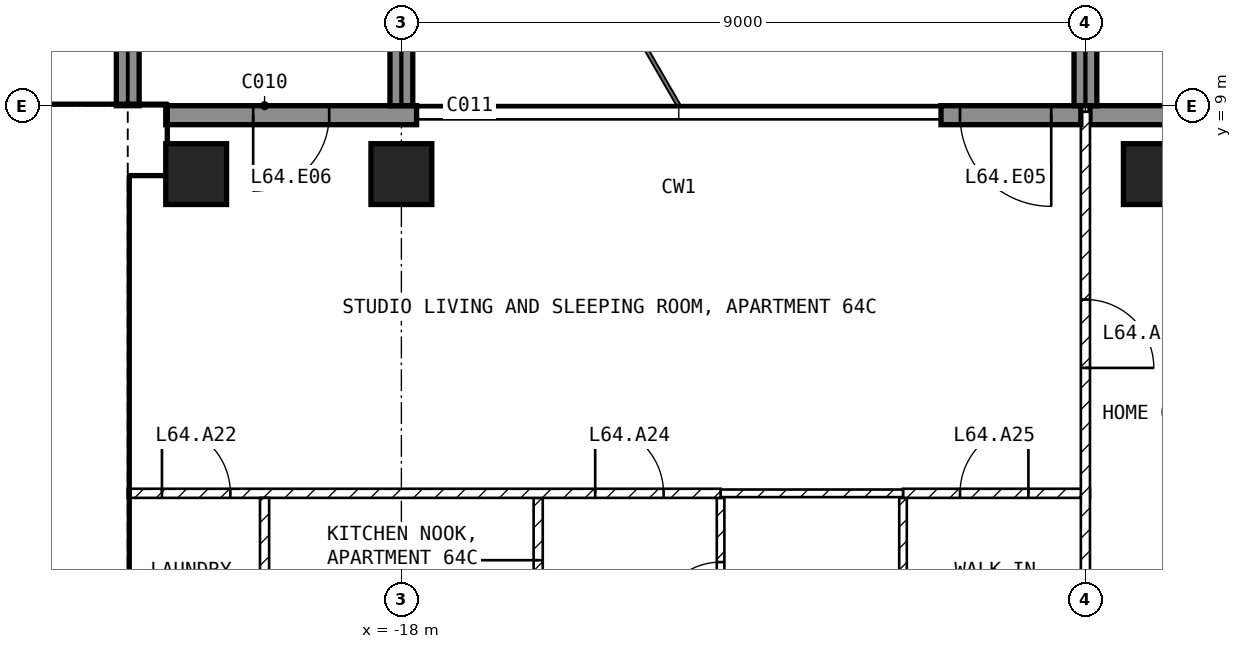
"""IFC4 building model, lengths in metres.
Left out: names, types, materials, properties, quantities, classifications, styles, units other than length and angle.
Written with IfcOpenShell. Run it as: python <this file> out.ifc"""

import sys

from ifc_helpers import new_model, si_unit, direction, frame, frame_2d, origin, origin_2d, place, context, subcontext, project, spatial, rectangle, extrude, element, fill, save


model = new_model("IFC4")
c1 = context("Model", 3, precision=1e-05, world=origin(), true_north=direction((0.0, 1.0)))
c2 = subcontext(c1, "Body", "Model", "MODEL_VIEW")
j1 = project(units=[si_unit("LENGTHUNIT", "METRE"), si_unit("PLANEANGLEUNIT", "RADIAN")], contexts=[c1])
p1 = place(None, origin())
s1 = spatial("IfcSite", under=j1, at=p1, CompositionType="ELEMENT")
p2 = place(p1, origin())
s2 = spatial("IfcBuilding", under=s1, at=p2, CompositionType="ELEMENT")
p3 = place(p2, frame((0.0, 0.0, 253.5)))
s3 = spatial("IfcBuildingStorey", under=s2, at=p3, CompositionType="ELEMENT", Elevation=253.5)
for number, where, z_axis, x_axis in (
    (1, (-20.7, 8.1, -0.25), (0.0, 0.0, 1.0), (1.0, 0.0, 0.0)),
    (2, (-18.0, 8.1, -0.25), (0.0, 0.0, 1.0), (1.0, 0.0, 0.0)),
    (3, (-8.1, 8.1, -0.25), (0.0, 0.0, 1.0), (1.0, 0.0, 0.0)),
):
    element("IfcColumn", number, at=place(p3, frame(where, z_axis=z_axis, x_axis=x_axis)), inside=s3, PredefinedType="COLUMN", context=c2, shape_type="SweptSolid", body=[
        extrude(rectangle(XDim=0.8, YDim=0.8, at=origin_2d()), origin(), (0.0, 0.0, 1.0), 3.5),
    ])
p4 = place(p3, frame((-5.9, 8.875, 0.0), z_axis=(0.0, 0.0, 1.0), x_axis=(-1.0, 0.0, 0.0)))
e4 = element("IfcWall", 4, at=p4, inside=s3, PredefinedType="SOLIDWALL", context=c2, shape_type="SweptSolid", body=[
    extrude(rectangle(XDim=3.04, YDim=0.25, at=frame_2d((1.52, 0.0))), origin(), (0.0, 0.0, 1.0), 3.25),
])
p5 = place(p4, frame((0.25, 0.0, 0.0)))
e5 = element("IfcOpeningElement", 5, at=p5, cuts=e4, PredefinedType="OPENING", context=c2, shape_type="SweptSolid", body=[
    extrude(rectangle(XDim=1.2, YDim=2.4, at=frame_2d((0.6, 1.2))), frame((0.0, 0.135, 0.0), z_axis=(0.0, -1.0, 0.0), x_axis=(1.0, 0.0, 0.0)), (0.0, 0.0, 1.0), 0.27),
])
p6 = place(p3, frame((-9.06, 8.875, 0.0), z_axis=(0.0, 0.0, 1.0), x_axis=(-1.0, 0.0, 0.0)))
e6 = element("IfcWall", 6, at=p6, inside=s3, PredefinedType="SOLIDWALL", context=c2, shape_type="SweptSolid", body=[
    extrude(rectangle(XDim=1.84, YDim=0.25, at=frame_2d((0.92, 0.0))), origin(), (0.0, 0.0, 1.0), 3.25),
])
p7 = place(p6, frame((0.39, 0.0, 0.0)))
e7 = element("IfcOpeningElement", 7, at=p7, cuts=e6, PredefinedType="OPENING", context=c2, shape_type="SweptSolid", body=[
    extrude(rectangle(XDim=1.2, YDim=2.4, at=frame_2d((0.6, 1.2))), frame((0.0, 0.135, 0.0), z_axis=(0.0, -1.0, 0.0), x_axis=(1.0, 0.0, 0.0)), (0.0, 0.0, 1.0), 0.27),
])
p8 = place(p3, frame((-17.8, 8.875, 0.0), z_axis=(0.0, 0.0, 1.0), x_axis=(-1.0, 0.0, 0.0)))
e8 = element("IfcWall", 8, at=p8, inside=s3, PredefinedType="SOLIDWALL", context=c2, shape_type="SweptSolid", body=[
    extrude(rectangle(XDim=3.3, YDim=0.25, at=frame_2d((1.65, 0.0))), origin(), (0.0, 0.0, 1.0), 3.25),
])
p9 = place(p8, frame((1.15, 0.0, 0.0)))
e9 = element("IfcOpeningElement", 9, at=p9, cuts=e8, PredefinedType="OPENING", context=c2, shape_type="SweptSolid", body=[
    extrude(rectangle(XDim=1.0, YDim=2.4, at=frame_2d((0.5, 1.2))), frame((0.0, 0.135, 0.0), z_axis=(0.0, -1.0, 0.0), x_axis=(1.0, 0.0, 0.0)), (0.0, 0.0, 1.0), 0.27),
])
for number, where, z_axis, x_axis in (
    (10, (-21.6, 9.0, 0.0), (0.0, 0.0, 1.0), (0.0, 1.0, 0.0)),
    (11, (-18.0, 9.0, 0.0), (0.0, 0.0, 1.0), (0.0, 1.0, 0.0)),
    (12, (-9.0, 9.0, 0.0), (0.0, 0.0, 1.0), (0.0, 1.0, 0.0)),
):
    element("IfcWall", number, at=place(p3, frame(where, z_axis=z_axis, x_axis=x_axis)), inside=s3, PredefinedType="SOLIDWALL", context=c2, shape_type="SweptSolid", body=[
        extrude(rectangle(XDim=2.7, YDim=0.3, at=frame_2d((1.35, 0.0))), origin(), (0.0, 0.0, 1.0), 3.25),
    ])
p10 = place(p3, frame((-29.75, 8.55, 0.0), z_axis=(0.0, 0.0, 1.0), x_axis=(1.0, 0.0, 0.0)))
e13 = element("IfcWall", 13, at=p10, inside=s3, PredefinedType="SHEAR", context=c2, shape_type="SweptSolid", body=[
    extrude(rectangle(XDim=8.65, YDim=0.9, at=frame_2d((4.325, 0.0))), origin(), (0.0, 0.0, 1.0), 3.25),
])
p11 = place(p3, frame((-21.825, 1.2, 0.0), z_axis=(0.0, 0.0, 1.0), x_axis=(0.0, 1.0, 0.0)))
e14 = element("IfcWall", 14, at=p11, inside=s3, PredefinedType="SHEAR", context=c2, shape_type="SweptSolid", body=[
    extrude(rectangle(XDim=6.9, YDim=0.45, at=frame_2d((3.45, 0.0))), origin(), (0.0, 0.0, 1.0), 3.25),
])
p12 = place(p3, frame((-28.35, 5.15, 0.0), z_axis=(0.0, 0.0, 1.0), x_axis=(1.0, 0.0, 0.0)))
e15 = element("IfcWall", 15, at=p12, inside=s3, PredefinedType="SOLIDWALL", context=c2, shape_type="SweptSolid", body=[
    extrude(rectangle(XDim=6.3, YDim=0.2, at=frame_2d((3.15, 0.0))), origin(), (0.0, 0.0, 1.0), 3.25),
])
p13 = place(p12, frame((5.1, 0.0, 0.0)))
e16 = element("IfcOpeningElement", 16, at=p13, cuts=e15, PredefinedType="OPENING", context=c2, shape_type="SweptSolid", body=[
    extrude(rectangle(XDim=1.0, YDim=2.1, at=frame_2d((0.5, 1.05))), frame((0.0, 0.11, 0.0), z_axis=(0.0, -1.0, 0.0), x_axis=(1.0, 0.0, 0.0)), (0.0, 0.0, 1.0), 0.22),
])
p14 = place(p3, frame((-11.4, 1.3, 0.0), z_axis=(0.0, 0.0, 1.0), x_axis=(0.0, 1.0, 0.0)))
e17 = element("IfcWall", 17, at=p14, inside=s3, PredefinedType="PARTITIONING", context=c2, shape_type="SweptSolid", body=[
    extrude(rectangle(XDim=2.54, YDim=0.1, at=frame_2d((1.27, 0.0))), origin(), (0.0, 0.0, 1.0), 3.25),
])
p15 = place(p3, frame((-11.4, 3.9, 0.0), z_axis=(0.0, 0.0, 1.0), x_axis=(1.0, 0.0, 0.0)))
e18 = element("IfcWall", 18, at=p15, inside=s3, PredefinedType="PARTITIONING", context=c2, shape_type="SweptSolid", body=[
    extrude(rectangle(XDim=2.46, YDim=0.12, at=frame_2d((1.23, 0.0))), origin(), (0.0, 0.0, 1.0), 3.25),
])
p16 = place(p15, frame((0.75, 0.0, 0.0)))
e19 = element("IfcOpeningElement", 19, at=p16, cuts=e18, PredefinedType="OPENING", context=c2, shape_type="SweptSolid", body=[
    extrude(rectangle(XDim=0.9, YDim=2.1, at=frame_2d((0.45, 1.05))), frame((0.0, 0.07, 0.0), z_axis=(0.0, -1.0, 0.0), x_axis=(1.0, 0.0, 0.0)), (0.0, 0.0, 1.0), 0.14),
])
p17 = place(p3, frame((-9.0, 8.92, 0.0), z_axis=(0.0, 0.0, 1.0), x_axis=(0.0, -1.0, 0.0)))
e20 = element("IfcWall", 20, at=p17, inside=s3, PredefinedType="PARTITIONING", context=c2, shape_type="SweptSolid", body=[
    extrude(rectangle(XDim=7.62, YDim=0.12, at=frame_2d((3.81, 0.0))), origin(), (0.0, 0.0, 1.0), 3.25),
])
p18 = place(p17, frame((2.47, 0.0, 0.0)))
e21 = element("IfcOpeningElement", 21, at=p18, cuts=e20, PredefinedType="OPENING", context=c2, shape_type="SweptSolid", body=[
    extrude(rectangle(XDim=0.9, YDim=2.1, at=frame_2d((0.45, 1.05))), frame((0.0, 0.07, 0.0), z_axis=(0.0, -1.0, 0.0), x_axis=(1.0, 0.0, 0.0)), (0.0, 0.0, 1.0), 0.14),
])
p19 = place(p3, frame((-13.8, 1.3, 0.0), z_axis=(0.0, 0.0, 1.0), x_axis=(0.0, 1.0, 0.0)))
e22 = element("IfcWall", 22, at=p19, inside=s3, PredefinedType="PARTITIONING", context=c2, shape_type="SweptSolid", body=[
    extrude(rectangle(XDim=2.54, YDim=0.1, at=frame_2d((1.27, 0.0))), origin(), (0.0, 0.0, 1.0), 3.25),
])
p20 = place(p19, frame((0.845, 0.0, 0.0)))
e23 = element("IfcOpeningElement", 23, at=p20, cuts=e22, PredefinedType="OPENING", context=c2, shape_type="SweptSolid", body=[
    extrude(rectangle(XDim=0.85, YDim=2.1, at=frame_2d((0.425, 1.05))), frame((0.0, 0.06, 0.0), z_axis=(0.0, -1.0, 0.0), x_axis=(1.0, 0.0, 0.0)), (0.0, 0.0, 1.0), 0.12),
])
p21 = place(p3, frame((-13.8, 3.9, 0.0), z_axis=(0.0, 0.0, 1.0), x_axis=(1.0, 0.0, 0.0)))
e24 = element("IfcWall", 24, at=p21, inside=s3, PredefinedType="PARTITIONING", context=c2, shape_type="SweptSolid", body=[
    extrude(rectangle(XDim=2.4, YDim=0.1, at=frame_2d((1.2, 0.0))), origin(), (0.0, 0.0, 1.0), 3.25),
])
p22 = place(p3, frame((-16.2, 1.3, 0.0), z_axis=(0.0, 0.0, 1.0), x_axis=(0.0, 1.0, 0.0)))
e25 = element("IfcWall", 25, at=p22, inside=s3, PredefinedType="PARTITIONING", context=c2, shape_type="SweptSolid", body=[
    extrude(rectangle(XDim=2.54, YDim=0.12, at=frame_2d((1.27, 0.0))), origin(), (0.0, 0.0, 1.0), 3.25),
])
p23 = place(p22, frame((0.82, 0.0, 0.0)))
e26 = element("IfcOpeningElement", 26, at=p23, cuts=e25, PredefinedType="OPENING", context=c2, shape_type="SweptSolid", body=[
    extrude(rectangle(XDim=0.9, YDim=2.1, at=frame_2d((0.45, 1.05))), frame((0.0, 0.07, 0.0), z_axis=(0.0, -1.0, 0.0), x_axis=(1.0, 0.0, 0.0)), (0.0, 0.0, 1.0), 0.14),
])
p24 = place(p3, frame((-21.6, 3.9, 0.0), z_axis=(0.0, 0.0, 1.0), x_axis=(1.0, 0.0, 0.0)))
e27 = element("IfcWall", 27, at=p24, inside=s3, PredefinedType="PARTITIONING", context=c2, shape_type="SweptSolid", body=[
    extrude(rectangle(XDim=7.8, YDim=0.12, at=frame_2d((3.9, 0.0))), origin(), (0.0, 0.0, 1.0), 3.25),
])
p25 = place(p24, frame((0.45, 0.0, 0.0)))
e28 = element("IfcOpeningElement", 28, at=p25, cuts=e27, PredefinedType="OPENING", context=c2, shape_type="SweptSolid", body=[
    extrude(rectangle(XDim=0.9, YDim=2.1, at=frame_2d((0.45, 1.05))), frame((0.0, 0.07, 0.0), z_axis=(0.0, -1.0, 0.0), x_axis=(1.0, 0.0, 0.0)), (0.0, 0.0, 1.0), 0.14),
])
p26 = place(p24, frame((6.15, 0.0, 0.0)))
e29 = element("IfcOpeningElement", 29, at=p26, cuts=e27, PredefinedType="OPENING", context=c2, shape_type="SweptSolid", body=[
    extrude(rectangle(XDim=0.9, YDim=2.1, at=frame_2d((0.45, 1.05))), frame((0.0, 0.07, 0.0), z_axis=(0.0, -1.0, 0.0), x_axis=(1.0, 0.0, 0.0)), (0.0, 0.0, 1.0), 0.14),
])
p27 = place(p3, frame((-19.8, 1.3, 0.0), z_axis=(0.0, 0.0, 1.0), x_axis=(0.0, 1.0, 0.0)))
e30 = element("IfcWall", 30, at=p27, inside=s3, PredefinedType="PARTITIONING", context=c2, shape_type="SweptSolid", body=[
    extrude(rectangle(XDim=2.54, YDim=0.12, at=frame_2d((1.27, 0.0))), origin(), (0.0, 0.0, 1.0), 3.25),
])
p28 = place(p7, origin())
e31 = element("IfcDoor", 31, at=p28, inside=s3, OperationType="SINGLE_SWING_LEFT", PredefinedType="DOOR", context=c2, shape_type="SweptSolid", body=[
    extrude(rectangle(XDim=1.2, YDim=2.4, at=frame_2d((0.6, 1.2))), frame((0.0, 0.025, 0.0), z_axis=(0.0, -1.0, 0.0), x_axis=(1.0, 0.0, 0.0)), (0.0, 0.0, 1.0), 0.05),
])
fill(e7, e31)
p29 = place(p9, origin())
e32 = element("IfcDoor", 32, at=p29, inside=s3, OperationType="SINGLE_SWING_RIGHT", PredefinedType="DOOR", context=c2, shape_type="SweptSolid", body=[
    extrude(rectangle(XDim=1.0, YDim=2.4, at=frame_2d((0.5, 1.2))), frame((0.0, 0.025, 0.0), z_axis=(0.0, -1.0, 0.0), x_axis=(1.0, 0.0, 0.0)), (0.0, 0.0, 1.0), 0.05),
])
fill(e9, e32)
p30 = place(p13, origin())
e33 = element("IfcDoor", 33, at=p30, inside=s3, OperationType="SINGLE_SWING_LEFT", PredefinedType="DOOR", context=c2, shape_type="SweptSolid", body=[
    extrude(rectangle(XDim=1.0, YDim=2.1, at=frame_2d((0.5, 1.05))), frame((0.0, 0.025, 0.0), z_axis=(0.0, -1.0, 0.0), x_axis=(1.0, 0.0, 0.0)), (0.0, 0.0, 1.0), 0.05),
])
fill(e16, e33)
p31 = place(p20, origin())
e34 = element("IfcDoor", 34, at=p31, inside=s3, OperationType="SINGLE_SWING_LEFT", PredefinedType="DOOR", context=c2, shape_type="SweptSolid", body=[
    extrude(rectangle(XDim=0.85, YDim=2.1, at=frame_2d((0.425, 1.05))), frame((0.0, 0.025, 0.0), z_axis=(0.0, -1.0, 0.0), x_axis=(1.0, 0.0, 0.0)), (0.0, 0.0, 1.0), 0.05),
])
fill(e23, e34)
p32 = place(p18, origin())
e35 = element("IfcDoor", 35, at=p32, inside=s3, OperationType="SINGLE_SWING_RIGHT", PredefinedType="DOOR", context=c2, shape_type="SweptSolid", body=[
    extrude(rectangle(XDim=0.9, YDim=2.1, at=frame_2d((0.45, 1.05))), frame((0.0, 0.025, 0.0), z_axis=(0.0, -1.0, 0.0), x_axis=(1.0, 0.0, 0.0)), (0.0, 0.0, 1.0), 0.05),
])
fill(e21, e35)
p33 = place(p23, origin())
e36 = element("IfcDoor", 36, at=p33, inside=s3, OperationType="SINGLE_SWING_RIGHT", PredefinedType="DOOR", context=c2, shape_type="SweptSolid", body=[
    extrude(rectangle(XDim=0.9, YDim=2.1, at=frame_2d((0.45, 1.05))), frame((0.0, 0.025, 0.0), z_axis=(0.0, -1.0, 0.0), x_axis=(1.0, 0.0, 0.0)), (0.0, 0.0, 1.0), 0.05),
])
fill(e26, e36)
p34 = place(p25, origin())
e37 = element("IfcDoor", 37, at=p34, inside=s3, OperationType="SINGLE_SWING_LEFT", PredefinedType="DOOR", context=c2, shape_type="SweptSolid", body=[
    extrude(rectangle(XDim=0.9, YDim=2.1, at=frame_2d((0.45, 1.05))), frame((0.0, 0.025, 0.0), z_axis=(0.0, -1.0, 0.0), x_axis=(1.0, 0.0, 0.0)), (0.0, 0.0, 1.0), 0.05),
])
fill(e28, e37)
p35 = place(p26, origin())
e38 = element("IfcDoor", 38, at=p35, inside=s3, OperationType="SINGLE_SWING_LEFT", PredefinedType="DOOR", context=c2, shape_type="SweptSolid", body=[
    extrude(rectangle(XDim=0.9, YDim=2.1, at=frame_2d((0.45, 1.05))), frame((0.0, 0.025, 0.0), z_axis=(0.0, -1.0, 0.0), x_axis=(1.0, 0.0, 0.0)), (0.0, 0.0, 1.0), 0.05),
])
fill(e29, e38)
p36 = place(p16, origin())
e39 = element("IfcDoor", 39, at=p36, inside=s3, OperationType="SINGLE_SWING_RIGHT", PredefinedType="DOOR", context=c2, shape_type="SweptSolid", body=[
    extrude(rectangle(XDim=0.9, YDim=2.1, at=frame_2d((0.45, 1.05))), frame((0.0, 0.025, 0.0), z_axis=(0.0, -1.0, 0.0), x_axis=(1.0, 0.0, 0.0)), (0.0, 0.0, 1.0), 0.05),
])
fill(e19, e39)
save(model, sys.argv[1])
